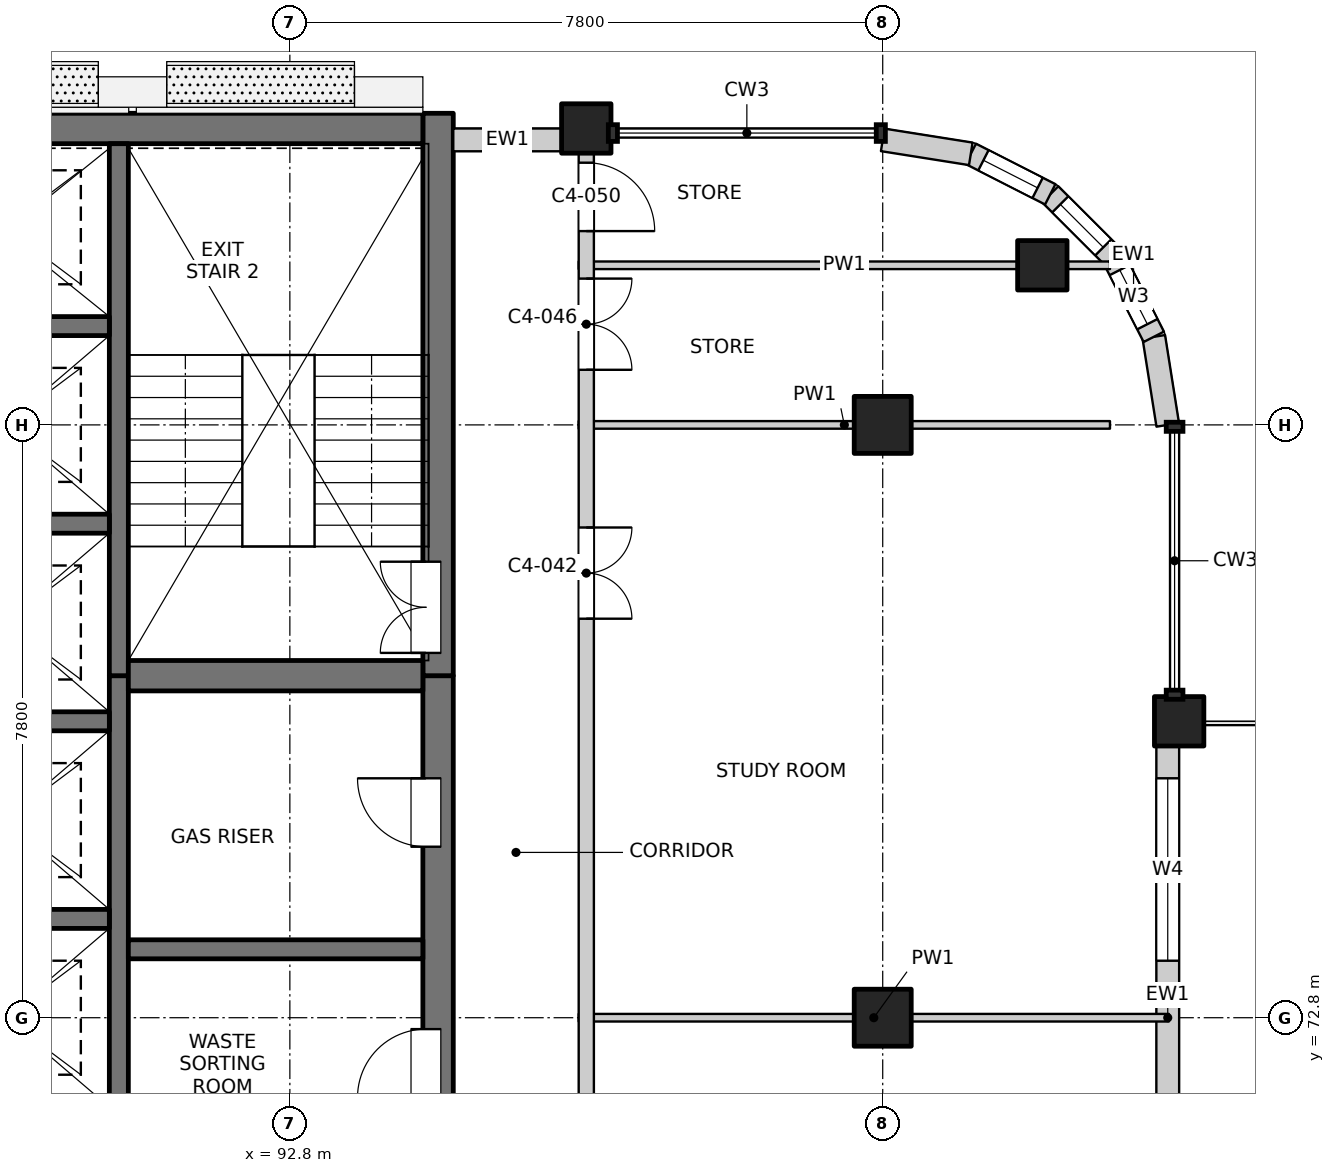
"""IFC4 building model, lengths in metres.
Left out: names, types, materials, properties, quantities, classifications, styles, units other than length and angle.
Written with IfcOpenShell. Run it as: python <this file> out.ifc"""

import sys

from ifc_helpers import new_model, si_unit, direction, frame, frame_2d, origin, origin_2d, place, context, subcontext, project, spatial, rectangle, extrude, element, fill, save


model = new_model("IFC4")
c1 = context("Model", 3, precision=1e-05, world=origin(), true_north=direction((0.0, 1.0)))
c2 = subcontext(c1, "Body", "Model", "MODEL_VIEW")
j1 = project(units=[si_unit("LENGTHUNIT", "METRE"), si_unit("PLANEANGLEUNIT", "RADIAN")], contexts=[c1])
p1 = place(None, origin())
s1 = spatial("IfcSite", under=j1, at=p1, CompositionType="ELEMENT")
p2 = place(p1, origin())
s2 = spatial("IfcBuilding", under=s1, at=p2, CompositionType="ELEMENT")
p3 = place(p2, frame((0.0, 0.0, 256.2)))
s3 = spatial("IfcBuildingStorey", under=s2, at=p3, CompositionType="ELEMENT", Elevation=256.2)
for number, where, z_axis, x_axis in (
    (1, (102.7, 82.7, -0.25), (0.0, 0.0, 1.0), (1.0, 0.0, 0.0)),
    (2, (104.5, 76.7, -0.25), (0.0, 0.0, 1.0), (1.0, 0.0, 0.0)),
    (3, (96.7, 84.5, -0.25), (0.0, 0.0, 1.0), (1.0, 0.0, 0.0)),
):
    element("IfcColumn", number, at=place(p3, frame(where, z_axis=z_axis, x_axis=x_axis)), inside=s3, PredefinedType="COLUMN", context=c2, shape_type="SweptSolid", body=[
        extrude(rectangle(XDim=0.65, YDim=0.65, at=origin_2d()), origin(), (0.0, 0.0, 1.0), 3.4),
    ])
for number, where, z_axis, x_axis in (
    (4, (100.6, 72.8, -0.25), (0.0, 0.0, 1.0), (1.0, 0.0, 0.0)),
    (5, (100.6, 80.6, -0.25), (0.0, 0.0, 1.0), (1.0, 0.0, 0.0)),
):
    element("IfcColumn", number, at=place(p3, frame(where, z_axis=z_axis, x_axis=x_axis)), inside=s3, PredefinedType="COLUMN", context=c2, shape_type="SweptSolid", body=[
        extrude(rectangle(XDim=0.75, YDim=0.75, at=origin_2d()), origin(), (0.0, 0.0, 1.0), 3.4),
    ])
p4 = place(p3, frame((94.75, 61.95, -0.25), z_axis=(0.0, 0.0, 1.0), x_axis=(0.0, 1.0, 0.0)))
e6 = element("IfcWall", 6, at=p4, inside=s3, PredefinedType="SOLIDWALL", context=c2, shape_type="SweptSolid", body=[
    extrude(rectangle(XDim=15.35, YDim=0.4, at=frame_2d((7.675, 0.0))), origin(), (0.0, 0.0, 1.0), 3.4),
])
p5 = place(p4, frame((0.925, 0.0, 0.25)))
e7 = element("IfcOpeningElement", 7, at=p5, cuts=e6, PredefinedType="OPENING", context=c2, shape_type="SweptSolid", body=[
    extrude(rectangle(XDim=0.9, YDim=2.1, at=frame_2d((0.45, 1.05))), frame((0.0, 0.21, 0.0), z_axis=(0.0, -1.0, 0.0), x_axis=(1.0, 0.0, 0.0)), (0.0, 0.0, 1.0), 0.42),
])
p6 = place(p4, frame((3.8, 0.0, 0.25)))
e8 = element("IfcOpeningElement", 8, at=p6, cuts=e6, PredefinedType="OPENING", context=c2, shape_type="SweptSolid", body=[
    extrude(rectangle(XDim=0.9, YDim=2.1, at=frame_2d((0.45, 1.05))), frame((0.0, 0.21, 0.0), z_axis=(0.0, -1.0, 0.0), x_axis=(1.0, 0.0, 0.0)), (0.0, 0.0, 1.0), 0.42),
])
p7 = place(p4, frame((6.8, 0.0, 0.25)))
e9 = element("IfcOpeningElement", 9, at=p7, cuts=e6, PredefinedType="OPENING", context=c2, shape_type="SweptSolid", body=[
    extrude(rectangle(XDim=0.9, YDim=2.1, at=frame_2d((0.45, 1.05))), frame((0.0, 0.21, 0.0), z_axis=(0.0, -1.0, 0.0), x_axis=(1.0, 0.0, 0.0)), (0.0, 0.0, 1.0), 0.42),
])
p8 = place(p4, frame((9.8, 0.0, 0.25)))
e10 = element("IfcOpeningElement", 10, at=p8, cuts=e6, PredefinedType="OPENING", context=c2, shape_type="SweptSolid", body=[
    extrude(rectangle(XDim=0.9, YDim=2.1, at=frame_2d((0.45, 1.05))), frame((0.0, 0.21, 0.0), z_axis=(0.0, -1.0, 0.0), x_axis=(1.0, 0.0, 0.0)), (0.0, 0.0, 1.0), 0.42),
])
p9 = place(p4, frame((13.1, 0.0, 0.25)))
e11 = element("IfcOpeningElement", 11, at=p9, cuts=e6, PredefinedType="OPENING", context=c2, shape_type="SweptSolid", body=[
    extrude(rectangle(XDim=0.9, YDim=2.1, at=frame_2d((0.45, 1.05))), frame((0.0, 0.21, 0.0), z_axis=(0.0, -1.0, 0.0), x_axis=(1.0, 0.0, 0.0)), (0.0, 0.0, 1.0), 0.42),
])
p10 = place(p3, frame((94.75, 77.3, -0.25), z_axis=(0.0, 0.0, 1.0), x_axis=(0.0, 1.0, 0.0)))
e12 = element("IfcWall", 12, at=p10, inside=s3, PredefinedType="SOLIDWALL", context=c2, shape_type="SweptSolid", body=[
    extrude(rectangle(XDim=7.4, YDim=0.4, at=frame_2d((3.7, 0.0))), origin(), (0.0, 0.0, 1.0), 3.4),
])
p11 = place(p10, frame((0.3, 0.0, 0.25)))
e13 = element("IfcOpeningElement", 13, at=p11, cuts=e12, PredefinedType="OPENING", context=c2, shape_type="SweptSolid", body=[
    extrude(rectangle(XDim=1.2, YDim=2.1, at=frame_2d((0.6, 1.05))), frame((0.0, 0.21, 0.0), z_axis=(0.0, -1.0, 0.0), x_axis=(1.0, 0.0, 0.0)), (0.0, 0.0, 1.0), 0.42),
])
p12 = place(p3, frame((75.45, 84.5, -0.25), z_axis=(0.0, 0.0, 1.0), x_axis=(1.0, 0.0, 0.0)))
e14 = element("IfcWall", 14, at=p12, inside=s3, PredefinedType="SOLIDWALL", context=c2, shape_type="SweptSolid", body=[
    extrude(rectangle(XDim=19.1, YDim=0.4, at=frame_2d((9.55, 0.0))), origin(), (0.0, 0.0, 1.0), 3.4),
])
p13 = place(p3, frame((90.55, 61.95, -0.25), z_axis=(0.0, 0.0, 1.0), x_axis=(0.0, 1.0, 0.0)))
e15 = element("IfcWall", 15, at=p13, inside=s3, PredefinedType="SOLIDWALL", context=c2, shape_type="SweptSolid", body=[
    extrude(rectangle(XDim=15.35, YDim=0.25, at=frame_2d((7.675, 0.0))), origin(), (0.0, 0.0, 1.0), 3.4),
])
p14 = place(p3, frame((90.55, 77.3, -0.25), z_axis=(0.0, 0.0, 1.0), x_axis=(0.0, 1.0, 0.0)))
e16 = element("IfcWall", 16, at=p14, inside=s3, PredefinedType="SOLIDWALL", context=c2, shape_type="SweptSolid", body=[
    extrude(rectangle(XDim=7.0, YDim=0.25, at=frame_2d((3.5, 0.0))), origin(), (0.0, 0.0, 1.0), 3.4),
])
for number, where, z_axis, x_axis in (
    (17, (87.425, 74.1, -0.25), (0.0, 0.0, 1.0), (1.0, 0.0, 0.0)),
    (18, (87.425, 76.7, -0.25), (0.0, 0.0, 1.0), (1.0, 0.0, 0.0)),
    (19, (87.425, 79.3, -0.25), (0.0, 0.0, 1.0), (1.0, 0.0, 0.0)),
    (20, (87.425, 81.9, -0.25), (0.0, 0.0, 1.0), (1.0, 0.0, 0.0)),
):
    element("IfcWall", number, at=place(p3, frame(where, z_axis=z_axis, x_axis=x_axis)), inside=s3, PredefinedType="SOLIDWALL", context=c2, shape_type="SweptSolid", body=[
        extrude(rectangle(XDim=3.0, YDim=0.25, at=frame_2d((1.5, 0.0))), origin(), (0.0, 0.0, 1.0), 3.4),
    ])
p15 = place(p3, frame((90.675, 73.7, -0.25), z_axis=(0.0, 0.0, 1.0), x_axis=(1.0, 0.0, 0.0)))
e21 = element("IfcWall", 21, at=p15, inside=s3, PredefinedType="SOLIDWALL", context=c2, shape_type="SweptSolid", body=[
    extrude(rectangle(XDim=3.875, YDim=0.25, at=frame_2d((1.938, 0.0))), origin(), (0.0, 0.0, 1.0), 3.4),
])
p16 = place(p3, frame((90.675, 77.3, -0.25), z_axis=(0.0, 0.0, 1.0), x_axis=(1.0, 0.0, 0.0)))
e22 = element("IfcWall", 22, at=p16, inside=s3, PredefinedType="SOLIDWALL", context=c2, shape_type="SweptSolid", body=[
    extrude(rectangle(XDim=3.875, YDim=0.4, at=frame_2d((1.938, 0.0))), origin(), (0.0, 0.0, 1.0), 3.4),
])
p17 = place(p3, frame((104.35, 69.225, 0.0), z_axis=(0.0, 0.0, 1.0), x_axis=(0.0, 1.0, 0.0)))
e23 = element("IfcWall", 23, at=p17, inside=s3, PredefinedType="SOLIDWALL", context=c2, shape_type="SweptSolid", body=[
    extrude(rectangle(XDim=7.15, YDim=0.3, at=frame_2d((3.575, 0.0))), origin(), (0.0, 0.0, 1.0), 2.7),
])
p18 = place(p17, frame((0.725, 0.0, 0.0)))
e24 = element("IfcOpeningElement", 24, at=p18, cuts=e23, PredefinedType="OPENING", context=c2, shape_type="SweptSolid", body=[
    extrude(rectangle(XDim=1.8, YDim=2.4, at=frame_2d((0.9, 1.2))), frame((0.0, 0.16, 0.0), z_axis=(0.0, -1.0, 0.0), x_axis=(1.0, 0.0, 0.0)), (0.0, 0.0, 1.0), 0.32),
])
p19 = place(p17, frame((4.325, 0.0, 0.6)))
e25 = element("IfcOpeningElement", 25, at=p19, cuts=e23, PredefinedType="OPENING", context=c2, shape_type="SweptSolid", body=[
    extrude(rectangle(XDim=2.4, YDim=2.1, at=frame_2d((1.2, 1.05))), frame((0.0, 0.16, 0.0), z_axis=(0.0, -1.0, 0.0), x_axis=(1.0, 0.0, 0.0)), (0.0, 0.0, 1.0), 0.32),
])
p20 = place(p3, frame((94.95, 84.35, 0.0), z_axis=(0.0, 0.0, 1.0), x_axis=(1.0, 0.0, 0.0)))
e26 = element("IfcWall", 26, at=p20, inside=s3, PredefinedType="SOLIDWALL", context=c2, shape_type="SweptSolid", body=[
    extrude(rectangle(XDim=1.425, YDim=0.3, at=frame_2d((0.712, 0.0))), origin(), (0.0, 0.0, 1.0), 2.7),
])
p21 = place(p3, frame((104.35, 80.6, 0.0), z_axis=(0.0, 0.0, 1.0), x_axis=(-0.156496880861, 0.987678452879, 0.0)))
e27 = element("IfcWall", 27, at=p21, inside=s3, PredefinedType="SOLIDWALL", context=c2, shape_type="SweptSolid", body=[
    extrude(rectangle(XDim=1.173, YDim=0.3, at=frame_2d((0.586, 0.0))), origin(), (0.0, 0.0, 1.0), 2.7),
])
p22 = place(p3, frame((104.167, 81.759, 0.0), z_axis=(0.0, 0.0, 1.0), x_axis=(-0.454025524128, 0.890988677504, 0.0)))
e28 = element("IfcWall", 28, at=p22, inside=s3, PredefinedType="SOLIDWALL", context=c2, shape_type="SweptSolid", body=[
    extrude(rectangle(XDim=1.173, YDim=0.3, at=frame_2d((0.587, 0.0))), origin(), (0.0, 0.0, 1.0), 2.7),
])
p23 = place(p22, frame((0.187, 0.0, 0.9)))
e29 = element("IfcOpeningElement", 29, at=p23, cuts=e28, PredefinedType="OPENING", context=c2, shape_type="SweptSolid", body=[
    extrude(rectangle(XDim=0.8, YDim=1.2, at=frame_2d((0.4, 0.6))), frame((0.0, 0.16, 0.0), z_axis=(0.0, -1.0, 0.0), x_axis=(1.0, 0.0, 0.0)), (0.0, 0.0, 1.0), 0.32),
])
p24 = place(p3, frame((103.634, 82.804, 0.0), z_axis=(0.0, 0.0, 1.0), x_axis=(-0.707106781187, 0.707106781187, 0.0)))
e30 = element("IfcWall", 30, at=p24, inside=s3, PredefinedType="SOLIDWALL", context=c2, shape_type="SweptSolid", body=[
    extrude(rectangle(XDim=1.173, YDim=0.3, at=frame_2d((0.586, 0.0))), origin(), (0.0, 0.0, 1.0), 2.7),
])
p25 = place(p24, frame((0.187, 0.0, 0.9)))
e31 = element("IfcOpeningElement", 31, at=p25, cuts=e30, PredefinedType="OPENING", context=c2, shape_type="SweptSolid", body=[
    extrude(rectangle(XDim=0.8, YDim=1.2, at=frame_2d((0.4, 0.6))), frame((0.0, 0.16, 0.0), z_axis=(0.0, -1.0, 0.0), x_axis=(1.0, 0.0, 0.0)), (0.0, 0.0, 1.0), 0.32),
])
p26 = place(p3, frame((102.804, 83.634, 0.0), z_axis=(0.0, 0.0, 1.0), x_axis=(-0.890988677504, 0.454025524128, 0.0)))
e32 = element("IfcWall", 32, at=p26, inside=s3, PredefinedType="SOLIDWALL", context=c2, shape_type="SweptSolid", body=[
    extrude(rectangle(XDim=1.173, YDim=0.3, at=frame_2d((0.587, 0.0))), origin(), (0.0, 0.0, 1.0), 2.7),
])
p27 = place(p26, frame((0.187, 0.0, 0.9)))
e33 = element("IfcOpeningElement", 33, at=p27, cuts=e32, PredefinedType="OPENING", context=c2, shape_type="SweptSolid", body=[
    extrude(rectangle(XDim=0.8, YDim=1.2, at=frame_2d((0.4, 0.6))), frame((0.0, 0.16, 0.0), z_axis=(0.0, -1.0, 0.0), x_axis=(1.0, 0.0, 0.0)), (0.0, 0.0, 1.0), 0.32),
])
p28 = place(p3, frame((101.759, 84.167, 0.0), z_axis=(0.0, 0.0, 1.0), x_axis=(-0.987678452879, 0.156496880861, 0.0)))
e34 = element("IfcWall", 34, at=p28, inside=s3, PredefinedType="SOLIDWALL", context=c2, shape_type="SweptSolid", body=[
    extrude(rectangle(XDim=1.173, YDim=0.3, at=frame_2d((0.586, 0.0))), origin(), (0.0, 0.0, 1.0), 2.7),
])
p29 = place(p3, frame((96.6, 72.8, 0.0), z_axis=(0.0, 0.0, 1.0), x_axis=(1.0, 0.0, 0.0)))
e35 = element("IfcWall", 35, at=p29, inside=s3, PredefinedType="PARTITIONING", context=c2, shape_type="SweptSolid", body=[
    extrude(rectangle(XDim=7.765, YDim=0.1, at=frame_2d((3.882, 0.0))), origin(), (0.0, 0.0, 1.0), 3.15),
])
for number, where, z_axis, x_axis in (
    (36, (96.6, 80.6, 0.0), (0.0, 0.0, 1.0), (1.0, 0.0, 0.0)),
    (37, (96.6, 82.7, 0.0), (0.0, 0.0, 1.0), (1.0, 0.0, 0.0)),
):
    element("IfcWall", number, at=place(p3, frame(where, z_axis=z_axis, x_axis=x_axis)), inside=s3, PredefinedType="PARTITIONING", context=c2, shape_type="SweptSolid", body=[
        extrude(rectangle(XDim=6.99, YDim=0.1, at=frame_2d((3.495, 0.0))), origin(), (0.0, 0.0, 1.0), 3.15),
    ])
p30 = place(p3, frame((96.7, 49.5, 0.0), z_axis=(0.0, 0.0, 1.0), x_axis=(0.0, 1.0, 0.0)))
e38 = element("IfcWall", 38, at=p30, inside=s3, PredefinedType="PARTITIONING", context=c2, shape_type="SweptSolid", body=[
    extrude(rectangle(XDim=34.865, YDim=0.2, at=frame_2d((17.433, 0.0))), origin(), (0.0, 0.0, 1.0), 3.15),
])
p31 = place(p30, frame((6.2, 0.0, 0.0)))
e39 = element("IfcOpeningElement", 39, at=p31, cuts=e38, PredefinedType="OPENING", context=c2, shape_type="SweptSolid", body=[
    extrude(rectangle(XDim=1.2, YDim=2.1, at=frame_2d((0.6, 1.05))), frame((0.0, 0.11, 0.0), z_axis=(0.0, -1.0, 0.0), x_axis=(1.0, 0.0, 0.0)), (0.0, 0.0, 1.0), 0.22),
])
p32 = place(p30, frame((12.95, 0.0, 0.0)))
e40 = element("IfcOpeningElement", 40, at=p32, cuts=e38, PredefinedType="OPENING", context=c2, shape_type="SweptSolid", body=[
    extrude(rectangle(XDim=1.2, YDim=2.1, at=frame_2d((0.6, 1.05))), frame((0.0, 0.11, 0.0), z_axis=(0.0, -1.0, 0.0), x_axis=(1.0, 0.0, 0.0)), (0.0, 0.0, 1.0), 0.22),
])
p33 = place(p30, frame((28.55, 0.0, 0.0)))
e41 = element("IfcOpeningElement", 41, at=p33, cuts=e38, PredefinedType="OPENING", context=c2, shape_type="SweptSolid", body=[
    extrude(rectangle(XDim=1.2, YDim=2.1, at=frame_2d((0.6, 1.05))), frame((0.0, 0.11, 0.0), z_axis=(0.0, -1.0, 0.0), x_axis=(1.0, 0.0, 0.0)), (0.0, 0.0, 1.0), 0.22),
])
p34 = place(p30, frame((31.825, 0.0, 0.0)))
e42 = element("IfcOpeningElement", 42, at=p34, cuts=e38, PredefinedType="OPENING", context=c2, shape_type="SweptSolid", body=[
    extrude(rectangle(XDim=1.2, YDim=2.1, at=frame_2d((0.6, 1.05))), frame((0.0, 0.11, 0.0), z_axis=(0.0, -1.0, 0.0), x_axis=(1.0, 0.0, 0.0)), (0.0, 0.0, 1.0), 0.22),
])
p35 = place(p30, frame((33.65, 0.0, 0.0)))
e43 = element("IfcOpeningElement", 43, at=p35, cuts=e38, PredefinedType="OPENING", context=c2, shape_type="SweptSolid", body=[
    extrude(rectangle(XDim=0.9, YDim=2.1, at=frame_2d((0.45, 1.05))), frame((0.0, 0.11, 0.0), z_axis=(0.0, -1.0, 0.0), x_axis=(1.0, 0.0, 0.0)), (0.0, 0.0, 1.0), 0.22),
])
p36 = place(p19, origin())
e44 = element("IfcWindow", 44, at=p36, inside=s3, PartitioningType="SINGLE_PANEL", PredefinedType="WINDOW", context=c2, shape_type="SweptSolid", body=[
    extrude(rectangle(XDim=2.4, YDim=2.1, at=frame_2d((1.2, 1.05))), frame((0.0, 0.03, 0.0), z_axis=(0.0, -1.0, 0.0), x_axis=(1.0, 0.0, 0.0)), (0.0, 0.0, 1.0), 0.06),
])
fill(e25, e44)
p37 = place(p23, origin())
e45 = element("IfcWindow", 45, at=p37, inside=s3, PartitioningType="SINGLE_PANEL", PredefinedType="WINDOW", context=c2, shape_type="SweptSolid", body=[
    extrude(rectangle(XDim=0.8, YDim=1.2, at=frame_2d((0.4, 0.6))), frame((0.0, 0.03, 0.0), z_axis=(0.0, -1.0, 0.0), x_axis=(1.0, 0.0, 0.0)), (0.0, 0.0, 1.0), 0.06),
])
fill(e29, e45)
p38 = place(p25, origin())
e46 = element("IfcWindow", 46, at=p38, inside=s3, PartitioningType="SINGLE_PANEL", PredefinedType="WINDOW", context=c2, shape_type="SweptSolid", body=[
    extrude(rectangle(XDim=0.8, YDim=1.2, at=frame_2d((0.4, 0.6))), frame((0.0, 0.03, 0.0), z_axis=(0.0, -1.0, 0.0), x_axis=(1.0, 0.0, 0.0)), (0.0, 0.0, 1.0), 0.06),
])
fill(e31, e46)
p39 = place(p27, origin())
e47 = element("IfcWindow", 47, at=p39, inside=s3, PartitioningType="SINGLE_PANEL", PredefinedType="WINDOW", context=c2, shape_type="SweptSolid", body=[
    extrude(rectangle(XDim=0.8, YDim=1.2, at=frame_2d((0.4, 0.6))), frame((0.0, 0.03, 0.0), z_axis=(0.0, -1.0, 0.0), x_axis=(1.0, 0.0, 0.0)), (0.0, 0.0, 1.0), 0.06),
])
fill(e33, e47)
p40 = place(p8, origin())
e48 = element("IfcDoor", 48, at=p40, inside=s3, OperationType="SINGLE_SWING_LEFT", PredefinedType="DOOR", context=c2, shape_type="SweptSolid", body=[
    extrude(rectangle(XDim=0.9, YDim=2.1, at=frame_2d((0.45, 1.05))), frame((0.0, 0.185, 0.0), z_axis=(0.0, -1.0, 0.0), x_axis=(1.0, 0.0, 0.0)), (0.0, 0.0, 1.0), 0.05),
])
fill(e10, e48)
p41 = place(p9, origin())
e49 = element("IfcDoor", 49, at=p41, inside=s3, OperationType="SINGLE_SWING_RIGHT", PredefinedType="DOOR", context=c2, shape_type="SweptSolid", body=[
    extrude(rectangle(XDim=0.9, YDim=2.1, at=frame_2d((0.45, 1.05))), frame((0.0, 0.185, 0.0), z_axis=(0.0, -1.0, 0.0), x_axis=(1.0, 0.0, 0.0)), (0.0, 0.0, 1.0), 0.05),
])
fill(e11, e49)
p42 = place(p11, origin())
e50 = element("IfcDoor", 50, at=p42, inside=s3, OperationType="DOUBLE_DOOR_SINGLE_SWING", PredefinedType="DOOR", context=c2, shape_type="SweptSolid", body=[
    extrude(rectangle(XDim=1.2, YDim=2.1, at=frame_2d((0.6, 1.05))), frame((0.0, 0.185, 0.0), z_axis=(0.0, -1.0, 0.0), x_axis=(1.0, 0.0, 0.0)), (0.0, 0.0, 1.0), 0.05),
])
fill(e13, e50)
p43 = place(p33, origin())
e51 = element("IfcDoor", 51, at=p43, inside=s3, OperationType="DOUBLE_DOOR_SINGLE_SWING", PredefinedType="DOOR", context=c2, shape_type="SweptSolid", body=[
    extrude(rectangle(XDim=1.2, YDim=2.1, at=frame_2d((0.6, 1.05))), frame((0.0, 0.025, 0.0), z_axis=(0.0, -1.0, 0.0), x_axis=(1.0, 0.0, 0.0)), (0.0, 0.0, 1.0), 0.05),
])
fill(e41, e51)
p44 = place(p34, origin())
e52 = element("IfcDoor", 52, at=p44, inside=s3, OperationType="DOUBLE_DOOR_SINGLE_SWING", PredefinedType="DOOR", context=c2, shape_type="SweptSolid", body=[
    extrude(rectangle(XDim=1.2, YDim=2.1, at=frame_2d((0.6, 1.05))), frame((0.0, 0.025, 0.0), z_axis=(0.0, -1.0, 0.0), x_axis=(1.0, 0.0, 0.0)), (0.0, 0.0, 1.0), 0.05),
])
fill(e42, e52)
p45 = place(p35, origin())
e53 = element("IfcDoor", 53, at=p45, inside=s3, OperationType="SINGLE_SWING_RIGHT", PredefinedType="DOOR", context=c2, shape_type="SweptSolid", body=[
    extrude(rectangle(XDim=0.9, YDim=2.1, at=frame_2d((0.45, 1.05))), frame((0.0, 0.025, 0.0), z_axis=(0.0, -1.0, 0.0), x_axis=(1.0, 0.0, 0.0)), (0.0, 0.0, 1.0), 0.05),
])
fill(e43, e53)
save(model, sys.argv[1])
